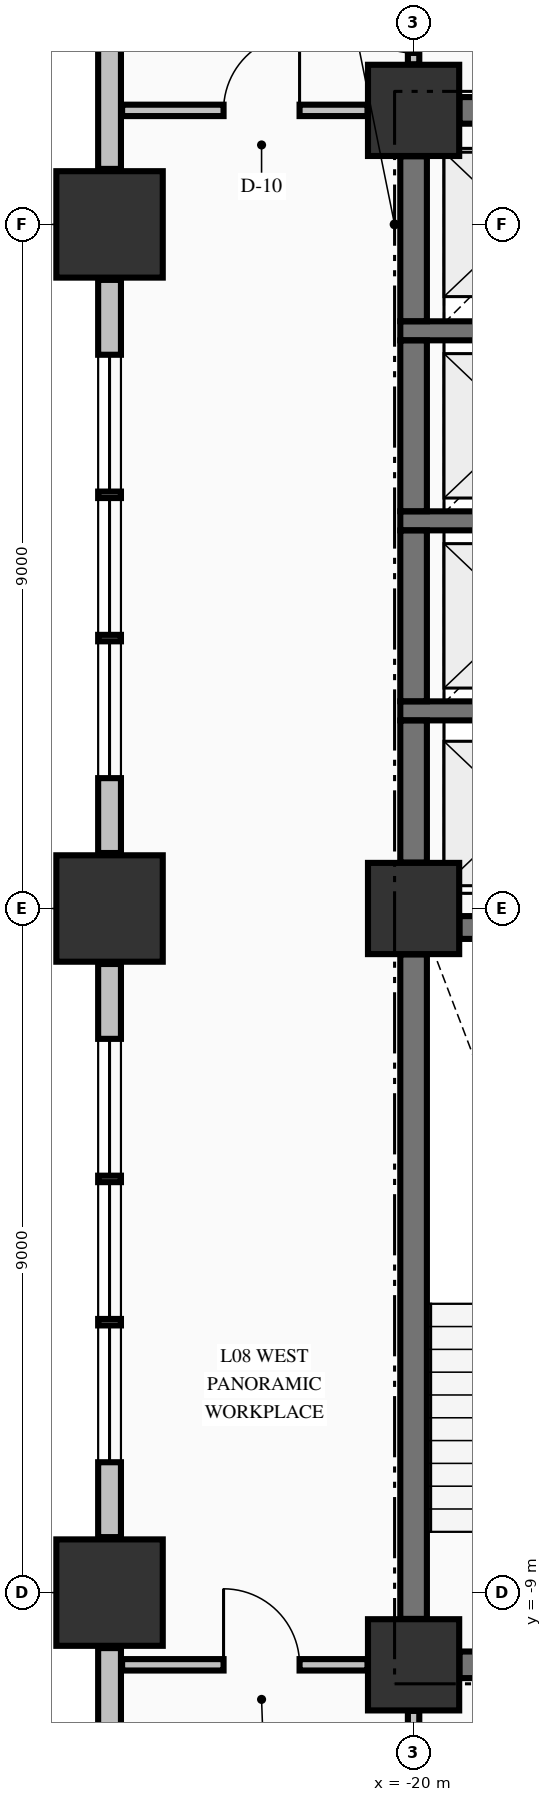
"""IFC4 building model, lengths in metres.
Left out: names, types, materials, properties, quantities, classifications, styles, units other than length and angle.
Written with IfcOpenShell. Run it as: python <this file> out.ifc"""

import sys

from ifc_helpers import new_model, si_unit, direction, frame, frame_2d, origin, origin_2d, place, context, subcontext, project, spatial, rectangle, extrude, element, fill, save


model = new_model("IFC4")
c1 = context("Model", 3, precision=1e-05, world=origin(), true_north=direction((0.0, 1.0)))
c2 = subcontext(c1, "Body", "Model", "MODEL_VIEW")
j1 = project(units=[si_unit("LENGTHUNIT", "METRE"), si_unit("PLANEANGLEUNIT", "RADIAN")], contexts=[c1])
p1 = place(None, origin())
s1 = spatial("IfcSite", under=j1, at=p1, CompositionType="ELEMENT")
p2 = place(p1, origin())
s2 = spatial("IfcBuilding", under=s1, at=p2, CompositionType="ELEMENT")
p3 = place(p2, frame((0.0, 0.0, 37.91)))
s3 = spatial("IfcBuildingStorey", under=s2, at=p3, CompositionType="ELEMENT", Elevation=37.91)
for number, where, z_axis, x_axis in (
    (1, (-24.0, -9.0, -0.25), (0.0, 0.0, 1.0), (1.0, 0.0, 0.0)),
    (2, (-24.0, 0.0, -0.25), (0.0, 0.0, 1.0), (1.0, 0.0, 0.0)),
    (3, (-24.0, 9.0, -0.25), (0.0, 0.0, 1.0), (1.0, 0.0, 0.0)),
):
    element("IfcColumn", number, at=place(p3, frame(where, z_axis=z_axis, x_axis=x_axis)), inside=s3, PredefinedType="COLUMN", context=c2, shape_type="SweptSolid", body=[
        extrude(rectangle(XDim=1.4, YDim=1.4, at=origin_2d()), origin(), (0.0, 0.0, 1.0), 3.57),
    ])
for number, where, z_axis, x_axis in (
    (4, (-20.0, -9.95, -0.25), (0.0, 0.0, 1.0), (1.0, 0.0, 0.0)),
    (5, (-20.0, 10.5, -0.25), (0.0, 0.0, 1.0), (1.0, 0.0, 0.0)),
    (6, (-20.0, 0.0, -0.25), (0.0, 0.0, 1.0), (1.0, 0.0, 0.0)),
):
    element("IfcColumn", number, at=place(p3, frame(where, z_axis=z_axis, x_axis=x_axis)), inside=s3, PredefinedType="COLUMN", context=c2, shape_type="SweptSolid", body=[
        extrude(rectangle(XDim=1.2, YDim=1.2, at=origin_2d()), origin(), (0.0, 0.0, 1.0), 3.57),
    ])
p4 = place(p3, frame((-24.0, -9.73, 0.0), z_axis=(0.0, 0.0, 1.0), x_axis=(0.0, -1.0, 0.0)))
e7 = element("IfcWall", 7, at=p4, inside=s3, PredefinedType="STANDARD", context=c2, shape_type="SweptSolid", body=[
    extrude(rectangle(XDim=12.54, YDim=0.3, at=frame_2d((6.27, 0.0))), origin(), (0.0, 0.0, 1.0), 2.712),
])
p5 = place(p3, frame((-24.0, -0.73, 0.0), z_axis=(0.0, 0.0, 1.0), x_axis=(0.0, -1.0, 0.0)))
e8 = element("IfcWall", 8, at=p5, inside=s3, PredefinedType="STANDARD", context=c2, shape_type="SweptSolid", body=[
    extrude(rectangle(XDim=7.54, YDim=0.3, at=frame_2d((3.77, 0.0))), origin(), (0.0, 0.0, 1.0), 2.712),
])
p6 = place(p5, frame((0.985, 0.0, 0.78)))
e9 = element("IfcOpeningElement", 9, at=p6, cuts=e8, PredefinedType="OPENING", context=c2, shape_type="SweptSolid", body=[
    extrude(rectangle(XDim=1.8, YDim=1.72, at=frame_2d((0.9, 0.86))), frame((0.0, 0.16, 0.0), z_axis=(0.0, -1.0, 0.0), x_axis=(1.0, 0.0, 0.0)), (0.0, 0.0, 1.0), 0.32),
])
p7 = place(p5, frame((2.87, 0.0, 0.78)))
e10 = element("IfcOpeningElement", 10, at=p7, cuts=e8, PredefinedType="OPENING", context=c2, shape_type="SweptSolid", body=[
    extrude(rectangle(XDim=1.8, YDim=1.72, at=frame_2d((0.9, 0.86))), frame((0.0, 0.16, 0.0), z_axis=(0.0, -1.0, 0.0), x_axis=(1.0, 0.0, 0.0)), (0.0, 0.0, 1.0), 0.32),
])
p8 = place(p5, frame((4.755, 0.0, 0.78)))
e11 = element("IfcOpeningElement", 11, at=p8, cuts=e8, PredefinedType="OPENING", context=c2, shape_type="SweptSolid", body=[
    extrude(rectangle(XDim=1.8, YDim=1.72, at=frame_2d((0.9, 0.86))), frame((0.0, 0.16, 0.0), z_axis=(0.0, -1.0, 0.0), x_axis=(1.0, 0.0, 0.0)), (0.0, 0.0, 1.0), 0.32),
])
p9 = place(p3, frame((-24.0, 8.27, 0.0), z_axis=(0.0, 0.0, 1.0), x_axis=(0.0, -1.0, 0.0)))
e12 = element("IfcWall", 12, at=p9, inside=s3, PredefinedType="STANDARD", context=c2, shape_type="SweptSolid", body=[
    extrude(rectangle(XDim=7.54, YDim=0.3, at=frame_2d((3.77, 0.0))), origin(), (0.0, 0.0, 1.0), 2.712),
])
p10 = place(p9, frame((0.985, 0.0, 0.78)))
e13 = element("IfcOpeningElement", 13, at=p10, cuts=e12, PredefinedType="OPENING", context=c2, shape_type="SweptSolid", body=[
    extrude(rectangle(XDim=1.8, YDim=1.72, at=frame_2d((0.9, 0.86))), frame((0.0, 0.16, 0.0), z_axis=(0.0, -1.0, 0.0), x_axis=(1.0, 0.0, 0.0)), (0.0, 0.0, 1.0), 0.32),
])
p11 = place(p9, frame((2.87, 0.0, 0.78)))
e14 = element("IfcOpeningElement", 14, at=p11, cuts=e12, PredefinedType="OPENING", context=c2, shape_type="SweptSolid", body=[
    extrude(rectangle(XDim=1.8, YDim=1.72, at=frame_2d((0.9, 0.86))), frame((0.0, 0.16, 0.0), z_axis=(0.0, -1.0, 0.0), x_axis=(1.0, 0.0, 0.0)), (0.0, 0.0, 1.0), 0.32),
])
p12 = place(p9, frame((4.755, 0.0, 0.78)))
e15 = element("IfcOpeningElement", 15, at=p12, cuts=e12, PredefinedType="OPENING", context=c2, shape_type="SweptSolid", body=[
    extrude(rectangle(XDim=1.8, YDim=1.72, at=frame_2d((0.9, 0.86))), frame((0.0, 0.16, 0.0), z_axis=(0.0, -1.0, 0.0), x_axis=(1.0, 0.0, 0.0)), (0.0, 0.0, 1.0), 0.32),
])
p13 = place(p3, frame((-24.0, 22.27, 0.0), z_axis=(0.0, 0.0, 1.0), x_axis=(0.0, -1.0, 0.0)))
e16 = element("IfcWall", 16, at=p13, inside=s3, PredefinedType="STANDARD", context=c2, shape_type="SweptSolid", body=[
    extrude(rectangle(XDim=12.54, YDim=0.3, at=frame_2d((6.27, 0.0))), origin(), (0.0, 0.0, 1.0), 2.712),
])
p14 = place(p3, frame((-19.396, -9.95, 0.0), z_axis=(0.0, 0.0, 1.0), x_axis=(1.0, 0.0, 0.0)))
e17 = element("IfcWall", 17, at=p14, inside=s3, PredefinedType="SHEAR", context=c2, shape_type="SweptSolid", body=[
    extrude(rectangle(XDim=4.696, YDim=0.35, at=frame_2d((2.348, 0.0))), origin(), (0.0, 0.0, 1.0), 3.32),
])
p15 = place(p14, frame((0.571, 0.0, 0.0)))
e18 = element("IfcOpeningElement", 18, at=p15, cuts=e17, PredefinedType="OPENING", context=c2, shape_type="SweptSolid", body=[
    extrude(rectangle(XDim=1.05, YDim=2.15, at=frame_2d((0.525, 1.075))), frame((0.0, 0.185, 0.0), z_axis=(0.0, -1.0, 0.0), x_axis=(1.0, 0.0, 0.0)), (0.0, 0.0, 1.0), 0.37),
])
p16 = place(p3, frame((-19.396, -0.25, 0.0), z_axis=(0.0, 0.0, 1.0), x_axis=(1.0, 0.0, 0.0)))
e19 = element("IfcWall", 19, at=p16, inside=s3, PredefinedType="SHEAR", context=c2, shape_type="SweptSolid", body=[
    extrude(rectangle(XDim=7.792, YDim=0.3, at=frame_2d((3.896, 0.0))), origin(), (0.0, 0.0, 1.0), 3.32),
])
p17 = place(p16, frame((5.696, 0.0, 0.0)))
e20 = element("IfcOpeningElement", 20, at=p17, cuts=e19, PredefinedType="OPENING", context=c2, shape_type="SweptSolid", body=[
    extrude(rectangle(XDim=1.1, YDim=2.15, at=frame_2d((0.55, 1.075))), frame((0.0, 0.16, 0.0), z_axis=(0.0, -1.0, 0.0), x_axis=(1.0, 0.0, 0.0)), (0.0, 0.0, 1.0), 0.32),
])
for number, where, z_axis, x_axis in (
    (21, (-20.175, 2.6, 0.0), (0.0, 0.0, 1.0), (1.0, 0.0, 0.0)),
    (22, (-20.175, 5.1, 0.0), (0.0, 0.0, 1.0), (1.0, 0.0, 0.0)),
    (23, (-20.175, 7.6, 0.0), (0.0, 0.0, 1.0), (1.0, 0.0, 0.0)),
):
    element("IfcWall", number, at=place(p3, frame(where, z_axis=z_axis, x_axis=x_axis)), inside=s3, PredefinedType="SOLIDWALL", context=c2, shape_type="SweptSolid", body=[
        extrude(rectangle(XDim=3.1, YDim=0.25, at=frame_2d((1.55, 0.0))), origin(), (0.0, 0.0, 1.0), 3.32),
    ])
p18 = place(p3, frame((-19.396, 10.5, 0.0), z_axis=(0.0, 0.0, 1.0), x_axis=(1.0, 0.0, 0.0)))
e24 = element("IfcWall", 24, at=p18, inside=s3, PredefinedType="SHEAR", context=c2, shape_type="SweptSolid", body=[
    extrude(rectangle(XDim=4.696, YDim=0.35, at=frame_2d((2.348, 0.0))), origin(), (0.0, 0.0, 1.0), 3.32),
])
p19 = place(p18, frame((2.796, 0.0, 0.0)))
e25 = element("IfcOpeningElement", 25, at=p19, cuts=e24, PredefinedType="OPENING", context=c2, shape_type="SweptSolid", body=[
    extrude(rectangle(XDim=1.2, YDim=2.15, at=frame_2d((0.6, 1.075))), frame((0.0, 0.185, 0.0), z_axis=(0.0, -1.0, 0.0), x_axis=(1.0, 0.0, 0.0)), (0.0, 0.0, 1.0), 0.37),
])
p20 = place(p3, frame((-23.835, -9.95, 0.0), z_axis=(0.0, 0.0, 1.0), x_axis=(1.0, 0.0, 0.0)))
e26 = element("IfcWall", 26, at=p20, inside=s3, PredefinedType="PARTITIONING", context=c2, shape_type="SweptSolid", body=[
    extrude(rectangle(XDim=3.229, YDim=0.15, at=frame_2d((1.615, 0.0))), origin(), (0.0, 0.0, 1.0), 3.32),
])
p21 = place(p20, frame((1.335, 0.0, 0.0)))
e27 = element("IfcOpeningElement", 27, at=p21, cuts=e26, PredefinedType="OPENING", context=c2, shape_type="SweptSolid", body=[
    extrude(rectangle(XDim=1.0, YDim=2.15, at=frame_2d((0.5, 1.075))), frame((0.0, 0.085, 0.0), z_axis=(0.0, -1.0, 0.0), x_axis=(1.0, 0.0, 0.0)), (0.0, 0.0, 1.0), 0.17),
])
p22 = place(p3, frame((-23.835, 10.5, 0.0), z_axis=(0.0, 0.0, 1.0), x_axis=(1.0, 0.0, 0.0)))
e28 = element("IfcWall", 28, at=p22, inside=s3, PredefinedType="PARTITIONING", context=c2, shape_type="SweptSolid", body=[
    extrude(rectangle(XDim=3.229, YDim=0.15, at=frame_2d((1.615, 0.0))), origin(), (0.0, 0.0, 1.0), 3.32),
])
p23 = place(p22, frame((1.335, 0.0, 0.0)))
e29 = element("IfcOpeningElement", 29, at=p23, cuts=e28, PredefinedType="OPENING", context=c2, shape_type="SweptSolid", body=[
    extrude(rectangle(XDim=1.0, YDim=2.15, at=frame_2d((0.5, 1.075))), frame((0.0, 0.085, 0.0), z_axis=(0.0, -1.0, 0.0), x_axis=(1.0, 0.0, 0.0)), (0.0, 0.0, 1.0), 0.17),
])
p24 = place(p3, frame((-20.0, -9.346, 0.0), z_axis=(0.0, 0.0, 1.0), x_axis=(0.0, 1.0, 0.0)))
e30 = element("IfcWall", 30, at=p24, inside=s3, PredefinedType="SHEAR", context=c2, shape_type="SweptSolid", body=[
    extrude(rectangle(XDim=8.742, YDim=0.35, at=frame_2d((4.371, 0.0))), origin(), (0.0, 0.0, 1.0), 3.32),
])
p25 = place(p3, frame((-20.0, 0.604, 0.0), z_axis=(0.0, 0.0, 1.0), x_axis=(0.0, 1.0, 0.0)))
e31 = element("IfcWall", 31, at=p25, inside=s3, PredefinedType="SHEAR", context=c2, shape_type="SweptSolid", body=[
    extrude(rectangle(XDim=1.869, YDim=0.35, at=frame_2d((0.935, 0.0))), origin(), (0.0, 0.0, 1.0), 3.32),
])
for number, where, z_axis, x_axis in (
    (32, (-20.0, 2.727, 0.0), (0.0, 0.0, 1.0), (0.0, 1.0, 0.0)),
    (33, (-20.0, 5.227, 0.0), (0.0, 0.0, 1.0), (0.0, 1.0, 0.0)),
):
    element("IfcWall", number, at=place(p3, frame(where, z_axis=z_axis, x_axis=x_axis)), inside=s3, PredefinedType="SHEAR", context=c2, shape_type="SweptSolid", body=[
        extrude(rectangle(XDim=2.246, YDim=0.35, at=frame_2d((1.123, 0.0))), origin(), (0.0, 0.0, 1.0), 3.32),
    ])
p26 = place(p3, frame((-20.0, 7.727, 0.0), z_axis=(0.0, 0.0, 1.0), x_axis=(0.0, 1.0, 0.0)))
e34 = element("IfcWall", 34, at=p26, inside=s3, PredefinedType="SHEAR", context=c2, shape_type="SweptSolid", body=[
    extrude(rectangle(XDim=2.169, YDim=0.35, at=frame_2d((1.084, 0.0))), origin(), (0.0, 0.0, 1.0), 3.32),
])
p27 = place(p3, frame((-20.0, -12.472, 0.0), z_axis=(0.0, 0.0, 1.0), x_axis=(0.0, 1.0, 0.0)))
e35 = element("IfcWall", 35, at=p27, inside=s3, PredefinedType="PARTITIONING", context=c2, shape_type="SweptSolid", body=[
    extrude(rectangle(XDim=1.916, YDim=0.15, at=frame_2d((0.958, 0.0))), origin(), (0.0, 0.0, 1.0), 3.32),
])
p28 = place(p27, frame((0.747, 0.0, 0.0)))
e36 = element("IfcOpeningElement", 36, at=p28, cuts=e35, PredefinedType="OPENING", context=c2, shape_type="SweptSolid", body=[
    extrude(rectangle(XDim=0.95, YDim=2.15, at=frame_2d((0.475, 1.075))), frame((0.0, 0.085, 0.0), z_axis=(0.0, -1.0, 0.0), x_axis=(1.0, 0.0, 0.0)), (0.0, 0.0, 1.0), 0.17),
])
p29 = place(p3, frame((-20.0, 11.106, 0.0), z_axis=(0.0, 0.0, 1.0), x_axis=(0.0, 1.0, 0.0)))
e37 = element("IfcWall", 37, at=p29, inside=s3, PredefinedType="PARTITIONING", context=c2, shape_type="SweptSolid", body=[
    extrude(rectangle(XDim=1.566, YDim=0.15, at=frame_2d((0.783, 0.0))), origin(), (0.0, 0.0, 1.0), 3.32),
])
p30 = place(p29, frame((0.15, 0.0, 0.0)))
e38 = element("IfcOpeningElement", 38, at=p30, cuts=e37, PredefinedType="OPENING", context=c2, shape_type="SweptSolid", body=[
    extrude(rectangle(XDim=0.95, YDim=2.15, at=frame_2d((0.475, 1.075))), frame((0.0, 0.085, 0.0), z_axis=(0.0, -1.0, 0.0), x_axis=(1.0, 0.0, 0.0)), (0.0, 0.0, 1.0), 0.17),
])
p31 = place(p6, origin())
e39 = element("IfcWindow", 39, at=p31, inside=s3, PartitioningType="SINGLE_PANEL", PredefinedType="WINDOW", context=c2, shape_type="SweptSolid", body=[
    extrude(rectangle(XDim=1.8, YDim=1.72, at=frame_2d((0.9, 0.86))), frame((0.0, 0.03, 0.0), z_axis=(0.0, -1.0, 0.0), x_axis=(1.0, 0.0, 0.0)), (0.0, 0.0, 1.0), 0.06),
])
fill(e9, e39)
p32 = place(p7, origin())
e40 = element("IfcWindow", 40, at=p32, inside=s3, PartitioningType="SINGLE_PANEL", PredefinedType="WINDOW", context=c2, shape_type="SweptSolid", body=[
    extrude(rectangle(XDim=1.8, YDim=1.72, at=frame_2d((0.9, 0.86))), frame((0.0, 0.03, 0.0), z_axis=(0.0, -1.0, 0.0), x_axis=(1.0, 0.0, 0.0)), (0.0, 0.0, 1.0), 0.06),
])
fill(e10, e40)
p33 = place(p8, origin())
e41 = element("IfcWindow", 41, at=p33, inside=s3, PartitioningType="SINGLE_PANEL", PredefinedType="WINDOW", context=c2, shape_type="SweptSolid", body=[
    extrude(rectangle(XDim=1.8, YDim=1.72, at=frame_2d((0.9, 0.86))), frame((0.0, 0.03, 0.0), z_axis=(0.0, -1.0, 0.0), x_axis=(1.0, 0.0, 0.0)), (0.0, 0.0, 1.0), 0.06),
])
fill(e11, e41)
p34 = place(p10, origin())
e42 = element("IfcWindow", 42, at=p34, inside=s3, PartitioningType="SINGLE_PANEL", PredefinedType="WINDOW", context=c2, shape_type="SweptSolid", body=[
    extrude(rectangle(XDim=1.8, YDim=1.72, at=frame_2d((0.9, 0.86))), frame((0.0, 0.03, 0.0), z_axis=(0.0, -1.0, 0.0), x_axis=(1.0, 0.0, 0.0)), (0.0, 0.0, 1.0), 0.06),
])
fill(e13, e42)
p35 = place(p11, origin())
e43 = element("IfcWindow", 43, at=p35, inside=s3, PartitioningType="SINGLE_PANEL", PredefinedType="WINDOW", context=c2, shape_type="SweptSolid", body=[
    extrude(rectangle(XDim=1.8, YDim=1.72, at=frame_2d((0.9, 0.86))), frame((0.0, 0.03, 0.0), z_axis=(0.0, -1.0, 0.0), x_axis=(1.0, 0.0, 0.0)), (0.0, 0.0, 1.0), 0.06),
])
fill(e14, e43)
p36 = place(p12, origin())
e44 = element("IfcWindow", 44, at=p36, inside=s3, PartitioningType="SINGLE_PANEL", PredefinedType="WINDOW", context=c2, shape_type="SweptSolid", body=[
    extrude(rectangle(XDim=1.8, YDim=1.72, at=frame_2d((0.9, 0.86))), frame((0.0, 0.03, 0.0), z_axis=(0.0, -1.0, 0.0), x_axis=(1.0, 0.0, 0.0)), (0.0, 0.0, 1.0), 0.06),
])
fill(e15, e44)
p37 = place(p30, origin())
e45 = element("IfcDoor", 45, at=p37, inside=s3, OperationType="SINGLE_SWING_RIGHT", PredefinedType="DOOR", context=c2, shape_type="SweptSolid", body=[
    extrude(rectangle(XDim=0.95, YDim=2.15, at=frame_2d((0.475, 1.075))), frame((0.0, 0.025, 0.0), z_axis=(0.0, -1.0, 0.0), x_axis=(1.0, 0.0, 0.0)), (0.0, 0.0, 1.0), 0.05),
])
fill(e38, e45)
p38 = place(p23, origin())
e46 = element("IfcDoor", 46, at=p38, inside=s3, OperationType="SINGLE_SWING_RIGHT", PredefinedType="DOOR", context=c2, shape_type="SweptSolid", body=[
    extrude(rectangle(XDim=1.0, YDim=2.15, at=frame_2d((0.5, 1.075))), frame((0.0, 0.025, 0.0), z_axis=(0.0, -1.0, 0.0), x_axis=(1.0, 0.0, 0.0)), (0.0, 0.0, 1.0), 0.05),
])
fill(e29, e46)
p39 = place(p21, origin())
e47 = element("IfcDoor", 47, at=p39, inside=s3, OperationType="SINGLE_SWING_LEFT", PredefinedType="DOOR", context=c2, shape_type="SweptSolid", body=[
    extrude(rectangle(XDim=1.0, YDim=2.15, at=frame_2d((0.5, 1.075))), frame((0.0, 0.025, 0.0), z_axis=(0.0, -1.0, 0.0), x_axis=(1.0, 0.0, 0.0)), (0.0, 0.0, 1.0), 0.05),
])
fill(e27, e47)
save(model, sys.argv[1])
